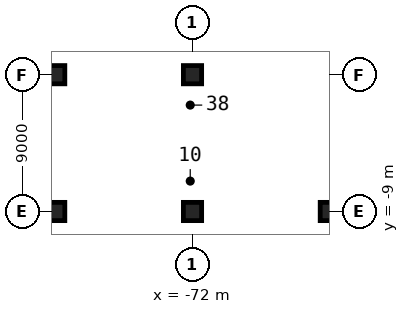
"""IFC4 building model, lengths in metres.
Left out: names, types, materials, properties, quantities, classifications, styles, units other than length and angle.
Written with IfcOpenShell. Run it as: python <this file> out.ifc"""

import sys

from ifc_helpers import new_model, si_unit, direction, frame, origin, origin_2d, place, context, subcontext, project, spatial, rectangle, extrude, element, save


model = new_model("IFC4")
c1 = context("Model", 3, precision=1e-05, world=origin(), true_north=direction((0.0, 1.0)))
c2 = subcontext(c1, "Body", "Model", "MODEL_VIEW")
j1 = project(units=[si_unit("LENGTHUNIT", "METRE"), si_unit("PLANEANGLEUNIT", "RADIAN")], contexts=[c1])
p1 = place(None, origin())
s1 = spatial("IfcSite", under=j1, at=p1, CompositionType="ELEMENT")
p2 = place(p1, origin())
s2 = spatial("IfcBuilding", under=s1, at=p2, CompositionType="ELEMENT")
p3 = place(p2, frame((0.0, 0.0, -9.0)))
s3 = spatial("IfcBuildingStorey", under=s2, at=p3, CompositionType="ELEMENT", Elevation=-9.0)
for number, where, z_axis, x_axis in (
    (1, (-81.0, -9.0, 0.0), (0.0, 0.0, 1.0), (1.0, 0.0, 0.0)),
    (2, (-81.0, 0.0, 0.0), (0.0, 0.0, 1.0), (1.0, 0.0, 0.0)),
    (3, (-72.0, -9.0, 0.0), (0.0, 0.0, 1.0), (1.0, 0.0, 0.0)),
    (4, (-72.0, 0.0, 0.0), (0.0, 0.0, 1.0), (1.0, 0.0, 0.0)),
    (5, (-63.0, -9.0, 0.0), (0.0, 0.0, 1.0), (1.0, 0.0, 0.0)),
):
    element("IfcColumn", number, at=place(p3, frame(where, z_axis=z_axis, x_axis=x_axis)), inside=s3, PredefinedType="COLUMN", context=c2, shape_type="SweptSolid", body=[
        extrude(rectangle(XDim=1.2, YDim=1.2, at=origin_2d()), origin(), (0.0, 0.0, 1.0), 4.5),
    ])
save(model, sys.argv[1])
